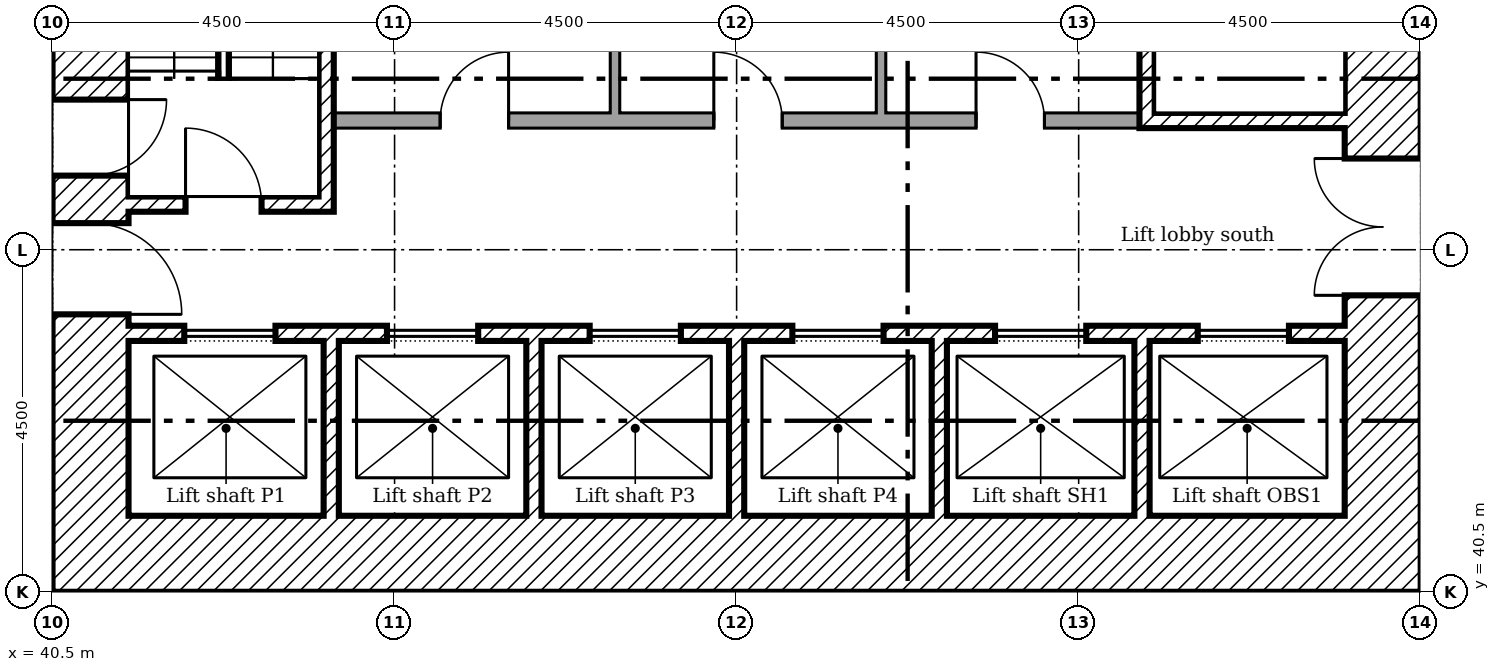
"""IFC4 building model, lengths in metres.
Left out: names, types, materials, properties, quantities, classifications, styles, units other than length and angle.
Written with IfcOpenShell. Run it as: python <this file> out.ifc"""

import sys

from ifc_helpers import new_model, si_unit, direction, frame, frame_2d, origin, place, context, subcontext, project, spatial, rectangle, extrude, element, fill, save


model = new_model("IFC4")
c1 = context("Model", 3, precision=1e-05, world=origin(), true_north=direction((0.0, 1.0)))
c2 = subcontext(c1, "Body", "Model", "MODEL_VIEW")
j1 = project(units=[si_unit("LENGTHUNIT", "METRE"), si_unit("PLANEANGLEUNIT", "RADIAN")], contexts=[c1])
p1 = place(None, origin())
s1 = spatial("IfcSite", under=j1, at=p1, CompositionType="ELEMENT")
p2 = place(p1, origin())
s2 = spatial("IfcBuilding", under=s1, at=p2, CompositionType="ELEMENT")
p3 = place(p2, origin())
s3 = spatial("IfcBuildingStorey", under=s2, at=p3, CompositionType="ELEMENT", Elevation=0.0)
p4 = place(p3, frame((58.0, 40.5, 0.0), z_axis=(0.0, 0.0, 1.0), x_axis=(0.0, 1.0, 0.0)))
e1 = element("IfcWall", 1, at=p4, inside=s3, PredefinedType="SHEAR", context=c2, shape_type="SweptSolid", body=[
    extrude(rectangle(XDim=18.0, YDim=1.0, at=frame_2d((9.0, 0.0))), origin(), (0.0, 0.0, 1.0), 5.5),
])
p5 = place(p4, frame((13.15, 0.0, 0.0)))
e2 = element("IfcOpeningElement", 2, at=p5, cuts=e1, PredefinedType="OPENING", context=c2, shape_type="SweptSolid", body=[
    extrude(rectangle(XDim=1.2, YDim=2.1, at=frame_2d((0.6, 1.05))), frame((0.0, 0.51, 0.0), z_axis=(0.0, -1.0, 0.0), x_axis=(1.0, 0.0, 0.0)), (0.0, 0.0, 1.0), 1.02),
])
p6 = place(p4, frame((3.9, 0.0, 0.0)))
e3 = element("IfcOpeningElement", 3, at=p6, cuts=e1, PredefinedType="OPENING", context=c2, shape_type="SweptSolid", body=[
    extrude(rectangle(XDim=1.8, YDim=2.1, at=frame_2d((0.9, 1.05))), frame((0.0, 0.51, 0.0), z_axis=(0.0, -1.0, 0.0), x_axis=(1.0, 0.0, 0.0)), (0.0, 0.0, 1.0), 1.02),
])
p7 = place(p4, frame((11.525, 0.0, 0.0)))
e4 = element("IfcOpeningElement", 4, at=p7, cuts=e1, PredefinedType="OPENING", context=c2, shape_type="SweptSolid", body=[
    extrude(rectangle(XDim=1.0, YDim=2.1, at=frame_2d((0.5, 1.05))), frame((0.0, 0.51, 0.0), z_axis=(0.0, -1.0, 0.0), x_axis=(1.0, 0.0, 0.0)), (0.0, 0.0, 1.0), 1.02),
])
p8 = place(p3, frame((41.5, 41.0, 0.0)))
e5 = element("IfcWall", 5, at=p8, inside=s3, PredefinedType="SHEAR", context=c2, shape_type="SweptSolid", body=[
    extrude(rectangle(XDim=16.0, YDim=1.0, at=frame_2d((8.0, 0.0))), origin(), (0.0, 0.0, 1.0), 5.5),
])
p9 = place(p3, frame((41.0, 40.5, 0.0), z_axis=(0.0, 0.0, 1.0), x_axis=(0.0, 1.0, 0.0)))
e6 = element("IfcWall", 6, at=p9, inside=s3, PredefinedType="SHEAR", context=c2, shape_type="SweptSolid", body=[
    extrude(rectangle(XDim=18.0, YDim=1.0, at=frame_2d((9.0, 0.0))), origin(), (0.0, 0.0, 1.0), 5.5),
])
p10 = place(p9, frame((3.65, 0.0, 0.0)))
e7 = element("IfcOpeningElement", 7, at=p10, cuts=e6, PredefinedType="OPENING", context=c2, shape_type="SweptSolid", body=[
    extrude(rectangle(XDim=1.2, YDim=2.1, at=frame_2d((0.6, 1.05))), frame((0.0, 0.51, 0.0), z_axis=(0.0, -1.0, 0.0), x_axis=(1.0, 0.0, 0.0)), (0.0, 0.0, 1.0), 1.02),
])
p11 = place(p9, frame((5.475, 0.0, 0.0)))
e8 = element("IfcOpeningElement", 8, at=p11, cuts=e6, PredefinedType="OPENING", context=c2, shape_type="SweptSolid", body=[
    extrude(rectangle(XDim=1.0, YDim=2.1, at=frame_2d((0.5, 1.05))), frame((0.0, 0.51, 0.0), z_axis=(0.0, -1.0, 0.0), x_axis=(1.0, 0.0, 0.0)), (0.0, 0.0, 1.0), 1.02),
])
p12 = place(p9, frame((12.3, 0.0, 0.0)))
e9 = element("IfcOpeningElement", 9, at=p12, cuts=e6, PredefinedType="OPENING", context=c2, shape_type="SweptSolid", body=[
    extrude(rectangle(XDim=1.0, YDim=2.1, at=frame_2d((0.5, 1.05))), frame((0.0, 0.51, 0.0), z_axis=(0.0, -1.0, 0.0), x_axis=(1.0, 0.0, 0.0)), (0.0, 0.0, 1.0), 1.02),
])
for number, where, z_axis, x_axis in (
    (10, (44.167, 41.5, 0.0), (0.0, 0.0, 1.0), (0.0, 1.0, 0.0)),
    (11, (46.833, 41.5, 0.0), (0.0, 0.0, 1.0), (0.0, 1.0, 0.0)),
    (12, (49.5, 41.5, 0.0), (0.0, 0.0, 1.0), (0.0, 1.0, 0.0)),
    (13, (52.167, 41.5, 0.0), (0.0, 0.0, 1.0), (0.0, 1.0, 0.0)),
    (14, (54.833, 41.5, 0.0), (0.0, 0.0, 1.0), (0.0, 1.0, 0.0)),
):
    element("IfcWall", number, at=place(p3, frame(where, z_axis=z_axis, x_axis=x_axis)), inside=s3, PredefinedType="SHEAR", context=c2, shape_type="SweptSolid", body=[
        extrude(rectangle(XDim=2.3, YDim=0.2, at=frame_2d((1.15, 0.0))), origin(), (0.0, 0.0, 1.0), 5.5),
    ])
p13 = place(p3, frame((41.5, 43.9, 0.0)))
e15 = element("IfcWall", 15, at=p13, inside=s3, PredefinedType="SHEAR", context=c2, shape_type="SweptSolid", body=[
    extrude(rectangle(XDim=16.0, YDim=0.2, at=frame_2d((8.0, 0.0))), origin(), (0.0, 0.0, 1.0), 5.5),
])
p14 = place(p13, frame((14.067, 0.0, 0.0)))
e16 = element("IfcOpeningElement", 16, at=p14, cuts=e15, PredefinedType="OPENING", context=c2, shape_type="SweptSolid", body=[
    extrude(rectangle(XDim=1.2, YDim=2.1, at=frame_2d((0.6, 1.05))), frame((0.0, 0.11, 0.0), z_axis=(0.0, -1.0, 0.0), x_axis=(1.0, 0.0, 0.0)), (0.0, 0.0, 1.0), 0.22),
])
p15 = place(p13, frame((0.733, 0.0, 0.0)))
e17 = element("IfcOpeningElement", 17, at=p15, cuts=e15, PredefinedType="OPENING", context=c2, shape_type="SweptSolid", body=[
    extrude(rectangle(XDim=1.2, YDim=2.1, at=frame_2d((0.6, 1.05))), frame((0.0, 0.11, 0.0), z_axis=(0.0, -1.0, 0.0), x_axis=(1.0, 0.0, 0.0)), (0.0, 0.0, 1.0), 0.22),
])
p16 = place(p13, frame((3.4, 0.0, 0.0)))
e18 = element("IfcOpeningElement", 18, at=p16, cuts=e15, PredefinedType="OPENING", context=c2, shape_type="SweptSolid", body=[
    extrude(rectangle(XDim=1.2, YDim=2.1, at=frame_2d((0.6, 1.05))), frame((0.0, 0.11, 0.0), z_axis=(0.0, -1.0, 0.0), x_axis=(1.0, 0.0, 0.0)), (0.0, 0.0, 1.0), 0.22),
])
p17 = place(p13, frame((6.067, 0.0, 0.0)))
e19 = element("IfcOpeningElement", 19, at=p17, cuts=e15, PredefinedType="OPENING", context=c2, shape_type="SweptSolid", body=[
    extrude(rectangle(XDim=1.2, YDim=2.1, at=frame_2d((0.6, 1.05))), frame((0.0, 0.11, 0.0), z_axis=(0.0, -1.0, 0.0), x_axis=(1.0, 0.0, 0.0)), (0.0, 0.0, 1.0), 0.22),
])
p18 = place(p13, frame((8.733, 0.0, 0.0)))
e20 = element("IfcOpeningElement", 20, at=p18, cuts=e15, PredefinedType="OPENING", context=c2, shape_type="SweptSolid", body=[
    extrude(rectangle(XDim=1.2, YDim=2.1, at=frame_2d((0.6, 1.05))), frame((0.0, 0.11, 0.0), z_axis=(0.0, -1.0, 0.0), x_axis=(1.0, 0.0, 0.0)), (0.0, 0.0, 1.0), 0.22),
])
p19 = place(p13, frame((11.4, 0.0, 0.0)))
e21 = element("IfcOpeningElement", 21, at=p19, cuts=e15, PredefinedType="OPENING", context=c2, shape_type="SweptSolid", body=[
    extrude(rectangle(XDim=1.2, YDim=2.1, at=frame_2d((0.6, 1.05))), frame((0.0, 0.11, 0.0), z_axis=(0.0, -1.0, 0.0), x_axis=(1.0, 0.0, 0.0)), (0.0, 0.0, 1.0), 0.22),
])
p20 = place(p3, frame((44.1, 45.5, 0.0), z_axis=(0.0, 0.0, 1.0), x_axis=(0.0, 1.0, 0.0)))
e22 = element("IfcWall", 22, at=p20, inside=s3, PredefinedType="SHEAR", context=c2, shape_type="SweptSolid", body=[
    extrude(rectangle(XDim=6.9, YDim=0.2, at=frame_2d((3.45, 0.0))), origin(), (0.0, 0.0, 1.0), 5.5),
])
p21 = place(p3, frame((41.5, 45.6, 0.0)))
e23 = element("IfcWall", 23, at=p21, inside=s3, PredefinedType="SHEAR", context=c2, shape_type="SweptSolid", body=[
    extrude(rectangle(XDim=2.5, YDim=0.2, at=frame_2d((1.25, 0.0))), origin(), (0.0, 0.0, 1.0), 5.5),
])
p22 = place(p21, frame((0.75, 0.0, 0.0)))
e24 = element("IfcOpeningElement", 24, at=p22, cuts=e23, PredefinedType="OPENING", context=c2, shape_type="SweptSolid", body=[
    extrude(rectangle(XDim=1.0, YDim=2.1, at=frame_2d((0.5, 1.05))), frame((0.0, 0.11, 0.0), z_axis=(0.0, -1.0, 0.0), x_axis=(1.0, 0.0, 0.0)), (0.0, 0.0, 1.0), 0.22),
])
p23 = place(p3, frame((54.8, 46.7, 0.0)))
e25 = element("IfcWall", 25, at=p23, inside=s3, PredefinedType="SHEAR", context=c2, shape_type="SweptSolid", body=[
    extrude(rectangle(XDim=2.7, YDim=0.2, at=frame_2d((1.35, 0.0))), origin(), (0.0, 0.0, 1.0), 5.5),
])
p24 = place(p3, frame((54.9, 46.8, 0.0), z_axis=(0.0, 0.0, 1.0), x_axis=(0.0, 1.0, 0.0)))
e26 = element("IfcWall", 26, at=p24, inside=s3, PredefinedType="SHEAR", context=c2, shape_type="SweptSolid", body=[
    extrude(rectangle(XDim=6.5, YDim=0.2, at=frame_2d((3.25, 0.0))), origin(), (0.0, 0.0, 1.0), 5.5),
])
p25 = place(p3, frame((44.2, 46.7, 0.0)))
e27 = element("IfcWall", 27, at=p25, inside=s3, PredefinedType="PARTITIONING", context=c2, shape_type="SweptSolid", body=[
    extrude(rectangle(XDim=10.6, YDim=0.2, at=frame_2d((5.3, 0.0))), origin(), (0.0, 0.0, 1.0), 5.5),
])
p26 = place(p25, frame((1.4, 0.0, 0.0)))
e28 = element("IfcOpeningElement", 28, at=p26, cuts=e27, PredefinedType="OPENING", context=c2, shape_type="SweptSolid", body=[
    extrude(rectangle(XDim=0.9, YDim=2.1, at=frame_2d((0.45, 1.05))), frame((0.0, 0.11, 0.0), z_axis=(0.0, -1.0, 0.0), x_axis=(1.0, 0.0, 0.0)), (0.0, 0.0, 1.0), 0.22),
])
p27 = place(p25, frame((5.0, 0.0, 0.0)))
e29 = element("IfcOpeningElement", 29, at=p27, cuts=e27, PredefinedType="OPENING", context=c2, shape_type="SweptSolid", body=[
    extrude(rectangle(XDim=0.9, YDim=2.1, at=frame_2d((0.45, 1.05))), frame((0.0, 0.11, 0.0), z_axis=(0.0, -1.0, 0.0), x_axis=(1.0, 0.0, 0.0)), (0.0, 0.0, 1.0), 0.22),
])
p28 = place(p25, frame((8.45, 0.0, 0.0)))
e30 = element("IfcOpeningElement", 30, at=p28, cuts=e27, PredefinedType="OPENING", context=c2, shape_type="SweptSolid", body=[
    extrude(rectangle(XDim=0.9, YDim=2.1, at=frame_2d((0.45, 1.05))), frame((0.0, 0.11, 0.0), z_axis=(0.0, -1.0, 0.0), x_axis=(1.0, 0.0, 0.0)), (0.0, 0.0, 1.0), 0.22),
])
p29 = place(p3, frame((47.9, 46.8, 0.0), z_axis=(0.0, 0.0, 1.0), x_axis=(0.0, 1.0, 0.0)))
e31 = element("IfcWall", 31, at=p29, inside=s3, PredefinedType="PARTITIONING", context=c2, shape_type="SweptSolid", body=[
    extrude(rectangle(XDim=5.0, YDim=0.125, at=frame_2d((2.5, 0.0))), origin(), (0.0, 0.0, 1.0), 5.5),
])
p30 = place(p3, frame((51.4, 46.8, 0.0), z_axis=(0.0, 0.0, 1.0), x_axis=(0.0, 1.0, 0.0)))
e32 = element("IfcWall", 32, at=p30, inside=s3, PredefinedType="PARTITIONING", context=c2, shape_type="SweptSolid", body=[
    extrude(rectangle(XDim=2.762, YDim=0.125, at=frame_2d((1.381, 0.0))), origin(), (0.0, 0.0, 1.0), 5.5),
])
p31 = place(p6, origin())
e33 = element("IfcDoor", 33, at=p31, inside=s3, OperationType="DOUBLE_DOOR_SINGLE_SWING", PredefinedType="DOOR", context=c2, shape_type="SweptSolid", body=[
    extrude(rectangle(XDim=1.8, YDim=2.1, at=frame_2d((0.9, 1.05))), frame((0.0, 0.025, 0.0), z_axis=(0.0, -1.0, 0.0), x_axis=(1.0, 0.0, 0.0)), (0.0, 0.0, 1.0), 0.05),
])
fill(e3, e33)
p32 = place(p10, frame((1.2, 0.0, 0.0), x_axis=(-1.0, 0.0, 0.0)))
e34 = element("IfcDoor", 34, at=p32, inside=s3, OperationType="SINGLE_SWING_LEFT", PredefinedType="DOOR", context=c2, shape_type="SweptSolid", body=[
    extrude(rectangle(XDim=1.2, YDim=2.1, at=frame_2d((0.6, 1.05))), frame((0.0, 0.025, 0.0), z_axis=(0.0, -1.0, 0.0), x_axis=(1.0, 0.0, 0.0)), (0.0, 0.0, 1.0), 0.05),
])
fill(e7, e34)
p33 = place(p22, origin())
e35 = element("IfcDoor", 35, at=p33, inside=s3, OperationType="SINGLE_SWING_RIGHT", PredefinedType="DOOR", context=c2, shape_type="SweptSolid", body=[
    extrude(rectangle(XDim=1.0, YDim=2.1, at=frame_2d((0.5, 1.05))), frame((0.0, 0.025, 0.0), z_axis=(0.0, -1.0, 0.0), x_axis=(1.0, 0.0, 0.0)), (0.0, 0.0, 1.0), 0.05),
])
fill(e24, e35)
p34 = place(p11, frame((1.0, 0.0, 0.0), x_axis=(-1.0, 0.0, 0.0)))
e36 = element("IfcDoor", 36, at=p34, inside=s3, OperationType="SINGLE_SWING_RIGHT", PredefinedType="DOOR", context=c2, shape_type="SweptSolid", body=[
    extrude(rectangle(XDim=1.0, YDim=2.1, at=frame_2d((0.5, 1.05))), frame((0.0, 0.025, 0.0), z_axis=(0.0, -1.0, 0.0), x_axis=(1.0, 0.0, 0.0)), (0.0, 0.0, 1.0), 0.05),
])
fill(e8, e36)
p35 = place(p26, origin())
e37 = element("IfcDoor", 37, at=p35, inside=s3, OperationType="SINGLE_SWING_LEFT", PredefinedType="DOOR", context=c2, shape_type="SweptSolid", body=[
    extrude(rectangle(XDim=0.9, YDim=2.1, at=frame_2d((0.45, 1.05))), frame((0.0, 0.025, 0.0), z_axis=(0.0, -1.0, 0.0), x_axis=(1.0, 0.0, 0.0)), (0.0, 0.0, 1.0), 0.05),
])
fill(e28, e37)
p36 = place(p27, origin())
e38 = element("IfcDoor", 38, at=p36, inside=s3, OperationType="SINGLE_SWING_RIGHT", PredefinedType="DOOR", context=c2, shape_type="SweptSolid", body=[
    extrude(rectangle(XDim=0.9, YDim=2.1, at=frame_2d((0.45, 1.05))), frame((0.0, 0.025, 0.0), z_axis=(0.0, -1.0, 0.0), x_axis=(1.0, 0.0, 0.0)), (0.0, 0.0, 1.0), 0.05),
])
fill(e29, e38)
p37 = place(p28, origin())
e39 = element("IfcDoor", 39, at=p37, inside=s3, OperationType="SINGLE_SWING_RIGHT", PredefinedType="DOOR", context=c2, shape_type="SweptSolid", body=[
    extrude(rectangle(XDim=0.9, YDim=2.1, at=frame_2d((0.45, 1.05))), frame((0.0, 0.025, 0.0), z_axis=(0.0, -1.0, 0.0), x_axis=(1.0, 0.0, 0.0)), (0.0, 0.0, 1.0), 0.05),
])
fill(e30, e39)
p38 = place(p14, origin())
e40 = element("IfcDoor", 40, at=p38, inside=s3, OperationType="SLIDING_TO_LEFT", PredefinedType="DOOR", context=c2, shape_type="SweptSolid", body=[
    extrude(rectangle(XDim=1.2, YDim=2.1, at=frame_2d((0.6, 1.05))), frame((0.0, 0.025, 0.0), z_axis=(0.0, -1.0, 0.0), x_axis=(1.0, 0.0, 0.0)), (0.0, 0.0, 1.0), 0.05),
])
fill(e16, e40)
p39 = place(p15, origin())
e41 = element("IfcDoor", 41, at=p39, inside=s3, OperationType="SLIDING_TO_LEFT", PredefinedType="DOOR", context=c2, shape_type="SweptSolid", body=[
    extrude(rectangle(XDim=1.2, YDim=2.1, at=frame_2d((0.6, 1.05))), frame((0.0, 0.025, 0.0), z_axis=(0.0, -1.0, 0.0), x_axis=(1.0, 0.0, 0.0)), (0.0, 0.0, 1.0), 0.05),
])
fill(e17, e41)
p40 = place(p16, origin())
e42 = element("IfcDoor", 42, at=p40, inside=s3, OperationType="SLIDING_TO_LEFT", PredefinedType="DOOR", context=c2, shape_type="SweptSolid", body=[
    extrude(rectangle(XDim=1.2, YDim=2.1, at=frame_2d((0.6, 1.05))), frame((0.0, 0.025, 0.0), z_axis=(0.0, -1.0, 0.0), x_axis=(1.0, 0.0, 0.0)), (0.0, 0.0, 1.0), 0.05),
])
fill(e18, e42)
p41 = place(p17, origin())
e43 = element("IfcDoor", 43, at=p41, inside=s3, OperationType="SLIDING_TO_LEFT", PredefinedType="DOOR", context=c2, shape_type="SweptSolid", body=[
    extrude(rectangle(XDim=1.2, YDim=2.1, at=frame_2d((0.6, 1.05))), frame((0.0, 0.025, 0.0), z_axis=(0.0, -1.0, 0.0), x_axis=(1.0, 0.0, 0.0)), (0.0, 0.0, 1.0), 0.05),
])
fill(e19, e43)
p42 = place(p18, origin())
e44 = element("IfcDoor", 44, at=p42, inside=s3, OperationType="SLIDING_TO_LEFT", PredefinedType="DOOR", context=c2, shape_type="SweptSolid", body=[
    extrude(rectangle(XDim=1.2, YDim=2.1, at=frame_2d((0.6, 1.05))), frame((0.0, 0.025, 0.0), z_axis=(0.0, -1.0, 0.0), x_axis=(1.0, 0.0, 0.0)), (0.0, 0.0, 1.0), 0.05),
])
fill(e20, e44)
p43 = place(p19, origin())
e45 = element("IfcDoor", 45, at=p43, inside=s3, OperationType="SLIDING_TO_LEFT", PredefinedType="DOOR", context=c2, shape_type="SweptSolid", body=[
    extrude(rectangle(XDim=1.2, YDim=2.1, at=frame_2d((0.6, 1.05))), frame((0.0, 0.025, 0.0), z_axis=(0.0, -1.0, 0.0), x_axis=(1.0, 0.0, 0.0)), (0.0, 0.0, 1.0), 0.05),
])
fill(e21, e45)
save(model, sys.argv[1])
